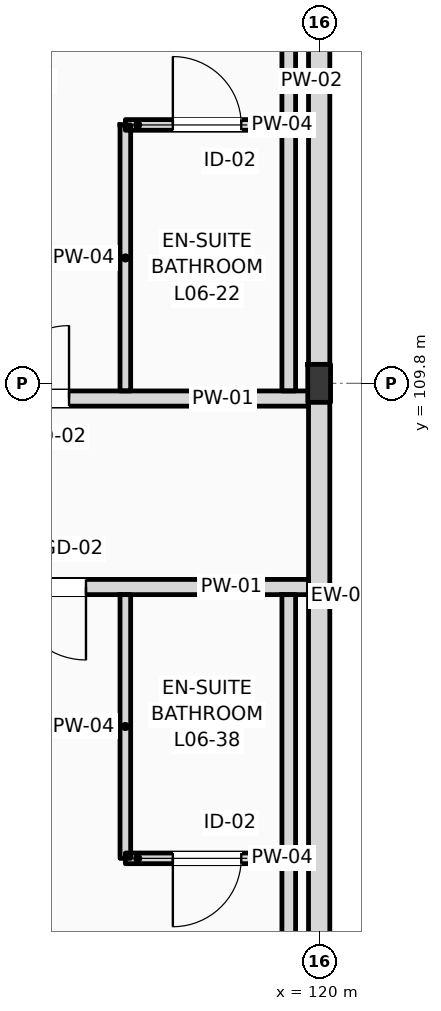
"""IFC4 building model, lengths in metres.
Left out: names, types, materials, properties, quantities, classifications, styles, units other than length and angle.
Written with IfcOpenShell. Run it as: python <this file> out.ifc"""

import sys

from ifc_helpers import new_model, si_unit, direction, frame, frame_2d, origin, origin_2d, place, context, subcontext, project, spatial, rectangle, i_section, extrude, element, fill, save


model = new_model("IFC4")
c1 = context("Model", 3, precision=1e-05, world=origin(), true_north=direction((0.0, 1.0)))
c2 = subcontext(c1, "Body", "Model", "MODEL_VIEW")
j1 = project(units=[si_unit("LENGTHUNIT", "METRE"), si_unit("PLANEANGLEUNIT", "RADIAN")], contexts=[c1])
p1 = place(None, origin())
s1 = spatial("IfcSite", under=j1, at=p1, CompositionType="ELEMENT")
p2 = place(p1, origin())
s2 = spatial("IfcBuilding", under=s1, at=p2, CompositionType="ELEMENT")
p3 = place(p2, frame((0.0, 0.0, 28.2)))
s3 = spatial("IfcBuildingStorey", under=s2, at=p3, CompositionType="ELEMENT", Elevation=28.2)
p4 = place(p3, frame((120.0, 109.8, 0.0), z_axis=(0.0, 0.0, 1.0), x_axis=(1.0, 0.0, 0.0)))
e1 = element("IfcColumn", 1, at=p4, inside=s3, PredefinedType="COLUMN", context=c2, shape_type="SweptSolid", body=[
    extrude(i_section(OverallWidth=0.3, OverallDepth=0.5, WebThickness=0.014, FlangeThickness=0.028, FilletRadius=0.027, at=origin_2d()), origin(), (0.0, 0.0, 1.0), 3.6),
])
p5 = place(p3, frame((120.0, 96.0, 0.0), z_axis=(0.0, 0.0, 1.0), x_axis=(0.0, 1.0, 0.0)))
e2 = element("IfcWall", 2, at=p5, inside=s3, PredefinedType="STANDARD", context=c2, shape_type="SweptSolid", body=[
    extrude(rectangle(XDim=22.0, YDim=0.28, at=frame_2d((11.0, 0.0))), origin(), (0.0, 0.0, 1.0), 2.99),
])
p6 = place(p3, frame((10.65, 109.6, 0.0), z_axis=(0.0, 0.0, 1.0), x_axis=(1.0, 0.0, 0.0)))
e3 = element("IfcWall", 3, at=p6, inside=s3, PredefinedType="PARTITIONING", context=c2, shape_type="SweptSolid", body=[
    extrude(rectangle(XDim=109.21, YDim=0.2, at=frame_2d((54.605, 0.0))), origin(), (0.0, 0.0, 1.0), 2.8),
])
p7 = place(p6, frame((12.611, 0.0, 0.0)))
e4 = element("IfcOpeningElement", 4, at=p7, cuts=e3, PredefinedType="OPENING", context=c2, shape_type="SweptSolid", body=[
    extrude(rectangle(XDim=1.02, YDim=2.2, at=frame_2d((0.51, 1.1))), frame((0.0, 0.11, 0.0), z_axis=(0.0, -1.0, 0.0), x_axis=(1.0, 0.0, 0.0)), (0.0, 0.0, 1.0), 0.22),
])
p8 = place(p6, frame((19.451, 0.0, 0.0)))
e5 = element("IfcOpeningElement", 5, at=p8, cuts=e3, PredefinedType="OPENING", context=c2, shape_type="SweptSolid", body=[
    extrude(rectangle(XDim=1.02, YDim=2.2, at=frame_2d((0.51, 1.1))), frame((0.0, 0.11, 0.0), z_axis=(0.0, -1.0, 0.0), x_axis=(1.0, 0.0, 0.0)), (0.0, 0.0, 1.0), 0.22),
])
p9 = place(p6, frame((23.842, 0.0, 0.0)))
e6 = element("IfcOpeningElement", 6, at=p9, cuts=e3, PredefinedType="OPENING", context=c2, shape_type="SweptSolid", body=[
    extrude(rectangle(XDim=1.02, YDim=2.2, at=frame_2d((0.51, 1.1))), frame((0.0, 0.11, 0.0), z_axis=(0.0, -1.0, 0.0), x_axis=(1.0, 0.0, 0.0)), (0.0, 0.0, 1.0), 0.22),
])
p10 = place(p6, frame((26.084, 0.0, 0.0)))
e7 = element("IfcOpeningElement", 7, at=p10, cuts=e3, PredefinedType="OPENING", context=c2, shape_type="SweptSolid", body=[
    extrude(rectangle(XDim=1.02, YDim=2.2, at=frame_2d((0.51, 1.1))), frame((0.0, 0.11, 0.0), z_axis=(0.0, -1.0, 0.0), x_axis=(1.0, 0.0, 0.0)), (0.0, 0.0, 1.0), 0.22),
])
p11 = place(p6, frame((32.655, 0.0, 0.0)))
e8 = element("IfcOpeningElement", 8, at=p11, cuts=e3, PredefinedType="OPENING", context=c2, shape_type="SweptSolid", body=[
    extrude(rectangle(XDim=0.96, YDim=2.2, at=frame_2d((0.48, 1.1))), frame((0.0, 0.11, 0.0), z_axis=(0.0, -1.0, 0.0), x_axis=(1.0, 0.0, 0.0)), (0.0, 0.0, 1.0), 0.22),
])
p12 = place(p6, frame((34.895, 0.0, 0.0)))
e9 = element("IfcOpeningElement", 9, at=p12, cuts=e3, PredefinedType="OPENING", context=c2, shape_type="SweptSolid", body=[
    extrude(rectangle(XDim=0.96, YDim=2.2, at=frame_2d((0.48, 1.1))), frame((0.0, 0.11, 0.0), z_axis=(0.0, -1.0, 0.0), x_axis=(1.0, 0.0, 0.0)), (0.0, 0.0, 1.0), 0.22),
])
p13 = place(p6, frame((41.436, 0.0, 0.0)))
e10 = element("IfcOpeningElement", 10, at=p13, cuts=e3, PredefinedType="OPENING", context=c2, shape_type="SweptSolid", body=[
    extrude(rectangle(XDim=0.96, YDim=2.2, at=frame_2d((0.48, 1.1))), frame((0.0, 0.11, 0.0), z_axis=(0.0, -1.0, 0.0), x_axis=(1.0, 0.0, 0.0)), (0.0, 0.0, 1.0), 0.22),
])
p14 = place(p6, frame((43.427, 0.0, 0.0)))
e11 = element("IfcOpeningElement", 11, at=p14, cuts=e3, PredefinedType="OPENING", context=c2, shape_type="SweptSolid", body=[
    extrude(rectangle(XDim=0.96, YDim=2.2, at=frame_2d((0.48, 1.1))), frame((0.0, 0.11, 0.0), z_axis=(0.0, -1.0, 0.0), x_axis=(1.0, 0.0, 0.0)), (0.0, 0.0, 1.0), 0.22),
])
p15 = place(p6, frame((50.218, 0.0, 0.0)))
e12 = element("IfcOpeningElement", 12, at=p15, cuts=e3, PredefinedType="OPENING", context=c2, shape_type="SweptSolid", body=[
    extrude(rectangle(XDim=0.96, YDim=2.2, at=frame_2d((0.48, 1.1))), frame((0.0, 0.11, 0.0), z_axis=(0.0, -1.0, 0.0), x_axis=(1.0, 0.0, 0.0)), (0.0, 0.0, 1.0), 0.22),
])
p16 = place(p6, frame((54.859, 0.0, 0.0)))
e13 = element("IfcOpeningElement", 13, at=p16, cuts=e3, PredefinedType="OPENING", context=c2, shape_type="SweptSolid", body=[
    extrude(rectangle(XDim=0.96, YDim=2.2, at=frame_2d((0.48, 1.1))), frame((0.0, 0.11, 0.0), z_axis=(0.0, -1.0, 0.0), x_axis=(1.0, 0.0, 0.0)), (0.0, 0.0, 1.0), 0.22),
])
p17 = place(p6, frame((59.0, 0.0, 0.0)))
e14 = element("IfcOpeningElement", 14, at=p17, cuts=e3, PredefinedType="OPENING", context=c2, shape_type="SweptSolid", body=[
    extrude(rectangle(XDim=0.96, YDim=2.2, at=frame_2d((0.48, 1.1))), frame((0.0, 0.11, 0.0), z_axis=(0.0, -1.0, 0.0), x_axis=(1.0, 0.0, 0.0)), (0.0, 0.0, 1.0), 0.22),
])
p18 = place(p6, frame((63.39, 0.0, 0.0)))
e15 = element("IfcOpeningElement", 15, at=p18, cuts=e3, PredefinedType="OPENING", context=c2, shape_type="SweptSolid", body=[
    extrude(rectangle(XDim=0.96, YDim=2.2, at=frame_2d((0.48, 1.1))), frame((0.0, 0.11, 0.0), z_axis=(0.0, -1.0, 0.0), x_axis=(1.0, 0.0, 0.0)), (0.0, 0.0, 1.0), 0.22),
])
p19 = place(p6, frame((65.631, 0.0, 0.0)))
e16 = element("IfcOpeningElement", 16, at=p19, cuts=e3, PredefinedType="OPENING", context=c2, shape_type="SweptSolid", body=[
    extrude(rectangle(XDim=0.96, YDim=2.2, at=frame_2d((0.48, 1.1))), frame((0.0, 0.11, 0.0), z_axis=(0.0, -1.0, 0.0), x_axis=(1.0, 0.0, 0.0)), (0.0, 0.0, 1.0), 0.22),
])
p20 = place(p6, frame((72.172, 0.0, 0.0)))
e17 = element("IfcOpeningElement", 17, at=p20, cuts=e3, PredefinedType="OPENING", context=c2, shape_type="SweptSolid", body=[
    extrude(rectangle(XDim=0.96, YDim=2.2, at=frame_2d((0.48, 1.1))), frame((0.0, 0.11, 0.0), z_axis=(0.0, -1.0, 0.0), x_axis=(1.0, 0.0, 0.0)), (0.0, 0.0, 1.0), 0.22),
])
p21 = place(p6, frame((74.413, 0.0, 0.0)))
e18 = element("IfcOpeningElement", 18, at=p21, cuts=e3, PredefinedType="OPENING", context=c2, shape_type="SweptSolid", body=[
    extrude(rectangle(XDim=0.96, YDim=2.2, at=frame_2d((0.48, 1.1))), frame((0.0, 0.11, 0.0), z_axis=(0.0, -1.0, 0.0), x_axis=(1.0, 0.0, 0.0)), (0.0, 0.0, 1.0), 0.22),
])
p22 = place(p6, frame((80.954, 0.0, 0.0)))
e19 = element("IfcOpeningElement", 19, at=p22, cuts=e3, PredefinedType="OPENING", context=c2, shape_type="SweptSolid", body=[
    extrude(rectangle(XDim=0.96, YDim=2.2, at=frame_2d((0.48, 1.1))), frame((0.0, 0.11, 0.0), z_axis=(0.0, -1.0, 0.0), x_axis=(1.0, 0.0, 0.0)), (0.0, 0.0, 1.0), 0.22),
])
p23 = place(p6, frame((83.195, 0.0, 0.0)))
e20 = element("IfcOpeningElement", 20, at=p23, cuts=e3, PredefinedType="OPENING", context=c2, shape_type="SweptSolid", body=[
    extrude(rectangle(XDim=0.96, YDim=2.2, at=frame_2d((0.48, 1.1))), frame((0.0, 0.11, 0.0), z_axis=(0.0, -1.0, 0.0), x_axis=(1.0, 0.0, 0.0)), (0.0, 0.0, 1.0), 0.22),
])
p24 = place(p6, frame((89.735, 0.0, 0.0)))
e21 = element("IfcOpeningElement", 21, at=p24, cuts=e3, PredefinedType="OPENING", context=c2, shape_type="SweptSolid", body=[
    extrude(rectangle(XDim=0.96, YDim=2.2, at=frame_2d((0.48, 1.1))), frame((0.0, 0.11, 0.0), z_axis=(0.0, -1.0, 0.0), x_axis=(1.0, 0.0, 0.0)), (0.0, 0.0, 1.0), 0.22),
])
p25 = place(p6, frame((94.126, 0.0, 0.0)))
e22 = element("IfcOpeningElement", 22, at=p25, cuts=e3, PredefinedType="OPENING", context=c2, shape_type="SweptSolid", body=[
    extrude(rectangle(XDim=0.96, YDim=2.2, at=frame_2d((0.48, 1.1))), frame((0.0, 0.11, 0.0), z_axis=(0.0, -1.0, 0.0), x_axis=(1.0, 0.0, 0.0)), (0.0, 0.0, 1.0), 0.22),
])
p26 = place(p6, frame((98.517, 0.0, 0.0)))
e23 = element("IfcOpeningElement", 23, at=p26, cuts=e3, PredefinedType="OPENING", context=c2, shape_type="SweptSolid", body=[
    extrude(rectangle(XDim=0.96, YDim=2.2, at=frame_2d((0.48, 1.1))), frame((0.0, 0.11, 0.0), z_axis=(0.0, -1.0, 0.0), x_axis=(1.0, 0.0, 0.0)), (0.0, 0.0, 1.0), 0.22),
])
p27 = place(p6, frame((102.908, 0.0, 0.0)))
e24 = element("IfcOpeningElement", 24, at=p27, cuts=e3, PredefinedType="OPENING", context=c2, shape_type="SweptSolid", body=[
    extrude(rectangle(XDim=0.96, YDim=2.2, at=frame_2d((0.48, 1.1))), frame((0.0, 0.11, 0.0), z_axis=(0.0, -1.0, 0.0), x_axis=(1.0, 0.0, 0.0)), (0.0, 0.0, 1.0), 0.22),
])
p28 = place(p6, frame((105.099, 0.0, 0.0)))
e25 = element("IfcOpeningElement", 25, at=p28, cuts=e3, PredefinedType="OPENING", context=c2, shape_type="SweptSolid", body=[
    extrude(rectangle(XDim=0.96, YDim=2.2, at=frame_2d((0.48, 1.1))), frame((0.0, 0.11, 0.0), z_axis=(0.0, -1.0, 0.0), x_axis=(1.0, 0.0, 0.0)), (0.0, 0.0, 1.0), 0.22),
])
p29 = place(p6, frame((2.716, 0.0, 0.0)))
e26 = element("IfcOpeningElement", 26, at=p29, cuts=e3, PredefinedType="OPENING", context=c2, shape_type="SweptSolid", body=[
    extrude(rectangle(XDim=1.35, YDim=2.25, at=frame_2d((0.675, 1.125))), frame((0.0, 0.11, 0.0), z_axis=(0.0, -1.0, 0.0), x_axis=(1.0, 0.0, 0.0)), (0.0, 0.0, 1.0), 0.22),
])
p30 = place(p6, frame((6.65, 0.0, 0.0)))
e27 = element("IfcOpeningElement", 27, at=p30, cuts=e3, PredefinedType="OPENING", context=c2, shape_type="SweptSolid", body=[
    extrude(rectangle(XDim=1.35, YDim=2.25, at=frame_2d((0.675, 1.125))), frame((0.0, 0.11, 0.0), z_axis=(0.0, -1.0, 0.0), x_axis=(1.0, 0.0, 0.0)), (0.0, 0.0, 1.0), 0.22),
])
p31 = place(p6, frame((10.583, 0.0, 0.0)))
e28 = element("IfcOpeningElement", 28, at=p31, cuts=e3, PredefinedType="OPENING", context=c2, shape_type="SweptSolid", body=[
    extrude(rectangle(XDim=1.35, YDim=2.25, at=frame_2d((0.675, 1.125))), frame((0.0, 0.11, 0.0), z_axis=(0.0, -1.0, 0.0), x_axis=(1.0, 0.0, 0.0)), (0.0, 0.0, 1.0), 0.22),
])
p32 = place(p3, frame((79.76, 107.12, 0.0), z_axis=(0.0, 0.0, 1.0), x_axis=(1.0, 0.0, 0.0)))
e29 = element("IfcWall", 29, at=p32, inside=s3, PredefinedType="PARTITIONING", context=c2, shape_type="SweptSolid", body=[
    extrude(rectangle(XDim=40.1, YDim=0.2, at=frame_2d((20.05, 0.0))), origin(), (0.0, 0.0, 1.0), 3.36),
])
p33 = place(p32, frame((2.497, 0.0, 0.0)))
e30 = element("IfcOpeningElement", 30, at=p33, cuts=e29, PredefinedType="OPENING", context=c2, shape_type="SweptSolid", body=[
    extrude(rectangle(XDim=0.96, YDim=2.2, at=frame_2d((0.48, 1.1))), frame((0.0, 0.11, 0.0), z_axis=(0.0, -1.0, 0.0), x_axis=(1.0, 0.0, 0.0)), (0.0, 0.0, 1.0), 0.22),
])
p34 = place(p32, frame((4.372, 0.0, 0.0)))
e31 = element("IfcOpeningElement", 31, at=p34, cuts=e29, PredefinedType="OPENING", context=c2, shape_type="SweptSolid", body=[
    extrude(rectangle(XDim=0.96, YDim=2.2, at=frame_2d((0.48, 1.1))), frame((0.0, 0.11, 0.0), z_axis=(0.0, -1.0, 0.0), x_axis=(1.0, 0.0, 0.0)), (0.0, 0.0, 1.0), 0.22),
])
p35 = place(p32, frame((10.507, 0.0, 0.0)))
e32 = element("IfcOpeningElement", 32, at=p35, cuts=e29, PredefinedType="OPENING", context=c2, shape_type="SweptSolid", body=[
    extrude(rectangle(XDim=0.96, YDim=2.2, at=frame_2d((0.48, 1.1))), frame((0.0, 0.11, 0.0), z_axis=(0.0, -1.0, 0.0), x_axis=(1.0, 0.0, 0.0)), (0.0, 0.0, 1.0), 0.22),
])
p36 = place(p32, frame((12.342, 0.0, 0.0)))
e33 = element("IfcOpeningElement", 33, at=p36, cuts=e29, PredefinedType="OPENING", context=c2, shape_type="SweptSolid", body=[
    extrude(rectangle(XDim=0.96, YDim=2.2, at=frame_2d((0.48, 1.1))), frame((0.0, 0.11, 0.0), z_axis=(0.0, -1.0, 0.0), x_axis=(1.0, 0.0, 0.0)), (0.0, 0.0, 1.0), 0.22),
])
p37 = place(p32, frame((18.477, 0.0, 0.0)))
e34 = element("IfcOpeningElement", 34, at=p37, cuts=e29, PredefinedType="OPENING", context=c2, shape_type="SweptSolid", body=[
    extrude(rectangle(XDim=0.96, YDim=2.2, at=frame_2d((0.48, 1.1))), frame((0.0, 0.11, 0.0), z_axis=(0.0, -1.0, 0.0), x_axis=(1.0, 0.0, 0.0)), (0.0, 0.0, 1.0), 0.22),
])
p38 = place(p32, frame((20.312, 0.0, 0.0)))
e35 = element("IfcOpeningElement", 35, at=p38, cuts=e29, PredefinedType="OPENING", context=c2, shape_type="SweptSolid", body=[
    extrude(rectangle(XDim=0.96, YDim=2.2, at=frame_2d((0.48, 1.1))), frame((0.0, 0.11, 0.0), z_axis=(0.0, -1.0, 0.0), x_axis=(1.0, 0.0, 0.0)), (0.0, 0.0, 1.0), 0.22),
])
p39 = place(p32, frame((26.447, 0.0, 0.0)))
e36 = element("IfcOpeningElement", 36, at=p39, cuts=e29, PredefinedType="OPENING", context=c2, shape_type="SweptSolid", body=[
    extrude(rectangle(XDim=0.96, YDim=2.2, at=frame_2d((0.48, 1.1))), frame((0.0, 0.11, 0.0), z_axis=(0.0, -1.0, 0.0), x_axis=(1.0, 0.0, 0.0)), (0.0, 0.0, 1.0), 0.22),
])
p40 = place(p32, frame((28.282, 0.0, 0.0)))
e37 = element("IfcOpeningElement", 37, at=p40, cuts=e29, PredefinedType="OPENING", context=c2, shape_type="SweptSolid", body=[
    extrude(rectangle(XDim=0.96, YDim=2.2, at=frame_2d((0.48, 1.1))), frame((0.0, 0.11, 0.0), z_axis=(0.0, -1.0, 0.0), x_axis=(1.0, 0.0, 0.0)), (0.0, 0.0, 1.0), 0.22),
])
p41 = place(p32, frame((34.417, 0.0, 0.0)))
e38 = element("IfcOpeningElement", 38, at=p41, cuts=e29, PredefinedType="OPENING", context=c2, shape_type="SweptSolid", body=[
    extrude(rectangle(XDim=0.96, YDim=2.2, at=frame_2d((0.48, 1.1))), frame((0.0, 0.11, 0.0), z_axis=(0.0, -1.0, 0.0), x_axis=(1.0, 0.0, 0.0)), (0.0, 0.0, 1.0), 0.22),
])
p42 = place(p32, frame((36.212, 0.0, 0.0)))
e39 = element("IfcOpeningElement", 39, at=p42, cuts=e29, PredefinedType="OPENING", context=c2, shape_type="SweptSolid", body=[
    extrude(rectangle(XDim=0.96, YDim=2.2, at=frame_2d((0.48, 1.1))), frame((0.0, 0.11, 0.0), z_axis=(0.0, -1.0, 0.0), x_axis=(1.0, 0.0, 0.0)), (0.0, 0.0, 1.0), 0.22),
])
p43 = place(p3, frame((119.6, 109.7, 0.0), z_axis=(0.0, 0.0, 1.0), x_axis=(0.0, 1.0, 0.0)))
e40 = element("IfcWall", 40, at=p43, inside=s3, PredefinedType="PARTITIONING", context=c2, shape_type="SweptSolid", body=[
    extrude(rectangle(XDim=8.15, YDim=0.18, at=frame_2d((4.075, 0.0))), origin(), (0.0, 0.0, 1.0), 3.36),
])
p44 = place(p3, frame((117.45, 109.7, 0.0), z_axis=(0.0, 0.0, 1.0), x_axis=(0.0, 1.0, 0.0)))
e41 = element("IfcWall", 41, at=p44, inside=s3, PredefinedType="PARTITIONING", context=c2, shape_type="SweptSolid", body=[
    extrude(rectangle(XDim=3.5, YDim=0.14, at=frame_2d((1.75, 0.0))), origin(), (0.0, 0.0, 1.0), 3.36),
])
p45 = place(p3, frame((117.45, 113.2, 0.0), z_axis=(0.0, 0.0, 1.0), x_axis=(1.0, 0.0, 0.0)))
e42 = element("IfcWall", 42, at=p45, inside=s3, PredefinedType="PARTITIONING", context=c2, shape_type="SweptSolid", body=[
    extrude(rectangle(XDim=2.15, YDim=0.14, at=frame_2d((1.075, 0.0))), origin(), (0.0, 0.0, 1.0), 3.36),
])
p46 = place(p45, frame((0.625, 0.0, 0.0)))
e43 = element("IfcOpeningElement", 43, at=p46, cuts=e42, PredefinedType="OPENING", context=c2, shape_type="SweptSolid", body=[
    extrude(rectangle(XDim=0.9, YDim=2.1, at=frame_2d((0.45, 1.05))), frame((0.0, 0.08, 0.0), z_axis=(0.0, -1.0, 0.0), x_axis=(1.0, 0.0, 0.0)), (0.0, 0.0, 1.0), 0.16),
])
p47 = place(p3, frame((119.6, 96.14, 0.0), z_axis=(0.0, 0.0, 1.0), x_axis=(0.0, 1.0, 0.0)))
e44 = element("IfcWall", 44, at=p47, inside=s3, PredefinedType="PARTITIONING", context=c2, shape_type="SweptSolid", body=[
    extrude(rectangle(XDim=10.88, YDim=0.18, at=frame_2d((5.44, 0.0))), origin(), (0.0, 0.0, 1.0), 3.36),
])
p48 = place(p3, frame((117.45, 103.55, 0.0), z_axis=(0.0, 0.0, 1.0), x_axis=(0.0, 1.0, 0.0)))
e45 = element("IfcWall", 45, at=p48, inside=s3, PredefinedType="PARTITIONING", context=c2, shape_type="SweptSolid", body=[
    extrude(rectangle(XDim=3.47, YDim=0.14, at=frame_2d((1.735, 0.0))), origin(), (0.0, 0.0, 1.0), 3.36),
])
p49 = place(p3, frame((117.45, 103.55, 0.0), z_axis=(0.0, 0.0, 1.0), x_axis=(1.0, 0.0, 0.0)))
e46 = element("IfcWall", 46, at=p49, inside=s3, PredefinedType="PARTITIONING", context=c2, shape_type="SweptSolid", body=[
    extrude(rectangle(XDim=2.15, YDim=0.14, at=frame_2d((1.075, 0.0))), origin(), (0.0, 0.0, 1.0), 3.36),
])
p50 = place(p49, frame((0.625, 0.0, 0.0)))
e47 = element("IfcOpeningElement", 47, at=p50, cuts=e46, PredefinedType="OPENING", context=c2, shape_type="SweptSolid", body=[
    extrude(rectangle(XDim=0.9, YDim=2.1, at=frame_2d((0.45, 1.05))), frame((0.0, 0.08, 0.0), z_axis=(0.0, -1.0, 0.0), x_axis=(1.0, 0.0, 0.0)), (0.0, 0.0, 1.0), 0.16),
])
p51 = place(p28, origin())
e48 = element("IfcDoor", 48, at=p51, inside=s3, OperationType="SINGLE_SWING_RIGHT", PredefinedType="DOOR", context=c2, shape_type="SweptSolid", body=[
    extrude(rectangle(XDim=0.96, YDim=2.2, at=frame_2d((0.48, 1.1))), frame((0.0, 0.025, 0.0), z_axis=(0.0, -1.0, 0.0), x_axis=(1.0, 0.0, 0.0)), (0.0, 0.0, 1.0), 0.05),
])
fill(e25, e48)
p52 = place(p46, origin())
e49 = element("IfcDoor", 49, at=p52, inside=s3, OperationType="SINGLE_SWING_LEFT", PredefinedType="DOOR", context=c2, shape_type="SweptSolid", body=[
    extrude(rectangle(XDim=0.9, YDim=2.1, at=frame_2d((0.45, 1.05))), frame((0.0, 0.025, 0.0), z_axis=(0.0, -1.0, 0.0), x_axis=(1.0, 0.0, 0.0)), (0.0, 0.0, 1.0), 0.05),
])
fill(e43, e49)
p53 = place(p42, frame((0.96, 0.0, 0.0), z_axis=(0.0, 0.0, 1.0), x_axis=(-1.0, 0.0, 0.0)))
e50 = element("IfcDoor", 50, at=p53, inside=s3, OperationType="SINGLE_SWING_RIGHT", PredefinedType="DOOR", context=c2, shape_type="SweptSolid", body=[
    extrude(rectangle(XDim=0.96, YDim=2.2, at=frame_2d((0.48, 1.1))), frame((0.0, 0.025, 0.0), z_axis=(0.0, -1.0, 0.0), x_axis=(1.0, 0.0, 0.0)), (0.0, 0.0, 1.0), 0.05),
])
fill(e39, e50)
p54 = place(p50, frame((0.9, 0.0, 0.0), z_axis=(0.0, 0.0, 1.0), x_axis=(-1.0, 0.0, 0.0)))
e51 = element("IfcDoor", 51, at=p54, inside=s3, OperationType="SINGLE_SWING_LEFT", PredefinedType="DOOR", context=c2, shape_type="SweptSolid", body=[
    extrude(rectangle(XDim=0.9, YDim=2.1, at=frame_2d((0.45, 1.05))), frame((0.0, 0.025, 0.0), z_axis=(0.0, -1.0, 0.0), x_axis=(1.0, 0.0, 0.0)), (0.0, 0.0, 1.0), 0.05),
])
fill(e47, e51)
save(model, sys.argv[1])
